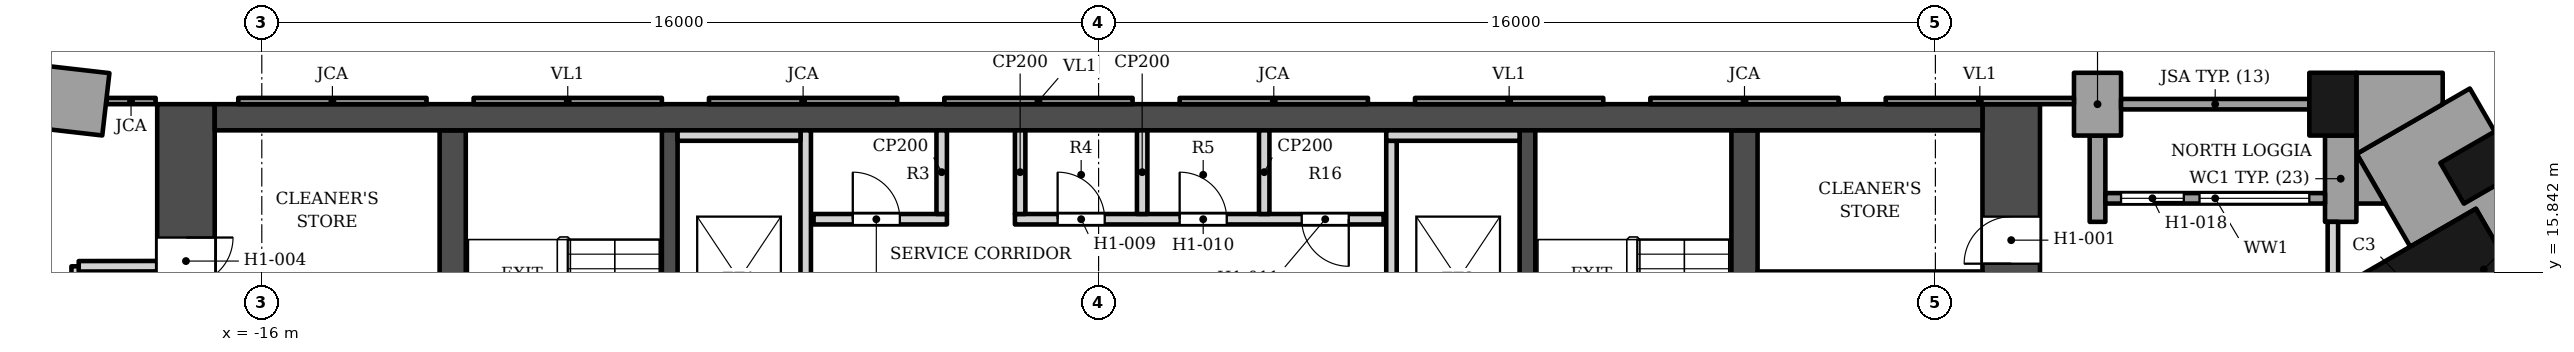
"""IFC4 building model, lengths in metres.
Left out: names, types, materials, properties, quantities, classifications, styles, units other than length and angle.
Written with IfcOpenShell. Run it as: python <this file> out.ifc"""

import sys

from ifc_helpers import new_model, si_unit, direction, frame, frame_2d, origin, origin_2d, place, context, subcontext, project, spatial, polyline, rectangle, outline, extrude, element, fill, save


model = new_model("IFC4")
c1 = context("Model", 3, precision=1e-05, world=origin(), true_north=direction((0.0, 1.0)))
c2 = subcontext(c1, "Body", "Model", "MODEL_VIEW")
j1 = project(units=[si_unit("LENGTHUNIT", "METRE"), si_unit("PLANEANGLEUNIT", "RADIAN")], contexts=[c1])
p1 = place(None, origin())
s1 = spatial("IfcSite", under=j1, at=p1, CompositionType="ELEMENT")
p2 = place(p1, origin())
s2 = spatial("IfcBuilding", under=s1, at=p2, CompositionType="ELEMENT")
p3 = place(p2, frame((0.0, 0.0, 46.0)))
s3 = spatial("IfcBuildingStorey", under=s2, at=p3, CompositionType="ELEMENT", Elevation=46.0)
p4 = place(p3, frame((-16.9, 18.802, 0.0), z_axis=(0.0, 0.0, 1.0), x_axis=(1.0, 0.0, 0.0)))
e1 = element("IfcWall", 1, at=p4, inside=s3, PredefinedType="SHEAR", context=c2, shape_type="SweptSolid", body=[
    extrude(rectangle(XDim=33.8, YDim=0.5, at=frame_2d((16.9, 0.0))), origin(), (0.0, 0.0, 1.0), 3.4),
])
p5 = place(p3, frame((-12.35, 5.253, 0.0), z_axis=(0.0, 0.0, 1.0), x_axis=(0.0, 1.0, 0.0)))
e2 = element("IfcWall", 2, at=p5, inside=s3, PredefinedType="SHEAR", context=c2, shape_type="SweptSolid", body=[
    extrude(rectangle(XDim=13.3, YDim=0.5, at=frame_2d((6.65, 0.0))), origin(), (0.0, 0.0, 1.0), 3.4),
])
p6 = place(p3, frame((-8.2, 5.253, 0.0), z_axis=(0.0, 0.0, 1.0), x_axis=(0.0, 1.0, 0.0)))
e3 = element("IfcWall", 3, at=p6, inside=s3, PredefinedType="SHEAR", context=c2, shape_type="SweptSolid", body=[
    extrude(rectangle(XDim=13.3, YDim=0.3, at=frame_2d((6.65, 0.0))), origin(), (0.0, 0.0, 1.0), 3.4),
])
p7 = place(p6, frame((7.1, 0.0, 0.0)))
e4 = element("IfcOpeningElement", 4, at=p7, cuts=e3, PredefinedType="OPENING", context=c2, shape_type="SweptSolid", body=[
    extrude(rectangle(XDim=1.4, YDim=2.1, at=frame_2d((0.7, 1.05))), frame((0.0, 0.16, 0.0), z_axis=(0.0, -1.0, 0.0), x_axis=(1.0, 0.0, 0.0)), (0.0, 0.0, 1.0), 0.32),
])
p8 = place(p6, frame((5.05, 0.0, 0.0)))
e5 = element("IfcOpeningElement", 5, at=p8, cuts=e3, PredefinedType="OPENING", context=c2, shape_type="SweptSolid", body=[
    extrude(rectangle(XDim=1.4, YDim=2.1, at=frame_2d((0.7, 1.05))), frame((0.0, 0.16, 0.0), z_axis=(0.0, -1.0, 0.0), x_axis=(1.0, 0.0, 0.0)), (0.0, 0.0, 1.0), 0.32),
])
p9 = place(p3, frame((12.35, 5.253, 0.0), z_axis=(0.0, 0.0, 1.0), x_axis=(0.0, 1.0, 0.0)))
e6 = element("IfcWall", 6, at=p9, inside=s3, PredefinedType="SHEAR", context=c2, shape_type="SweptSolid", body=[
    extrude(rectangle(XDim=13.3, YDim=0.5, at=frame_2d((6.65, 0.0))), origin(), (0.0, 0.0, 1.0), 3.4),
])
p10 = place(p3, frame((8.2, 5.253, 0.0), z_axis=(0.0, 0.0, 1.0), x_axis=(0.0, 1.0, 0.0)))
e7 = element("IfcWall", 7, at=p10, inside=s3, PredefinedType="SHEAR", context=c2, shape_type="SweptSolid", body=[
    extrude(rectangle(XDim=13.3, YDim=0.3, at=frame_2d((6.65, 0.0))), origin(), (0.0, 0.0, 1.0), 3.4),
])
p11 = place(p10, frame((7.1, 0.0, 0.0)))
e8 = element("IfcOpeningElement", 8, at=p11, cuts=e7, PredefinedType="OPENING", context=c2, shape_type="SweptSolid", body=[
    extrude(rectangle(XDim=1.4, YDim=2.1, at=frame_2d((0.7, 1.05))), frame((0.0, 0.16, 0.0), z_axis=(0.0, -1.0, 0.0), x_axis=(1.0, 0.0, 0.0)), (0.0, 0.0, 1.0), 0.32),
])
p12 = place(p10, frame((5.05, 0.0, 0.0)))
e9 = element("IfcOpeningElement", 9, at=p12, cuts=e7, PredefinedType="OPENING", context=c2, shape_type="SweptSolid", body=[
    extrude(rectangle(XDim=1.4, YDim=2.1, at=frame_2d((0.7, 1.05))), frame((0.0, 0.16, 0.0), z_axis=(0.0, -1.0, 0.0), x_axis=(1.0, 0.0, 0.0)), (0.0, 0.0, 1.0), 0.32),
])
p13 = place(p3, frame((-17.45, 5.853, 0.0), z_axis=(0.0, 0.0, 1.0), x_axis=(0.0, 1.0, 0.0)))
e10 = element("IfcWall", 10, at=p13, inside=s3, PredefinedType="SHEAR", context=c2, shape_type="SweptSolid", body=[
    extrude(rectangle(XDim=13.2, YDim=1.1, at=frame_2d((6.6, 0.0))), origin(), (0.0, 0.0, 1.0), 3.4),
])
p14 = place(p13, frame((4.1, 0.0, 0.0)))
e11 = element("IfcOpeningElement", 11, at=p14, cuts=e10, PredefinedType="OPENING", context=c2, shape_type="SweptSolid", body=[
    extrude(rectangle(XDim=1.6, YDim=2.1, at=frame_2d((0.8, 1.05))), frame((0.0, 0.56, 0.0), z_axis=(0.0, -1.0, 0.0), x_axis=(1.0, 0.0, 0.0)), (0.0, 0.0, 1.0), 1.12),
])
p15 = place(p13, frame((9.75, 0.0, 0.0)))
e12 = element("IfcOpeningElement", 12, at=p15, cuts=e10, PredefinedType="OPENING", context=c2, shape_type="SweptSolid", body=[
    extrude(rectangle(XDim=0.9, YDim=2.1, at=frame_2d((0.45, 1.05))), frame((0.0, 0.56, 0.0), z_axis=(0.0, -1.0, 0.0), x_axis=(1.0, 0.0, 0.0)), (0.0, 0.0, 1.0), 1.12),
])
p16 = place(p3, frame((17.45, 5.853, 0.0), z_axis=(0.0, 0.0, 1.0), x_axis=(0.0, 1.0, 0.0)))
e13 = element("IfcWall", 13, at=p16, inside=s3, PredefinedType="SHEAR", context=c2, shape_type="SweptSolid", body=[
    extrude(rectangle(XDim=13.2, YDim=1.1, at=frame_2d((6.6, 0.0))), origin(), (0.0, 0.0, 1.0), 3.4),
])
p17 = place(p16, frame((4.1, 0.0, 0.0)))
e14 = element("IfcOpeningElement", 14, at=p17, cuts=e13, PredefinedType="OPENING", context=c2, shape_type="SweptSolid", body=[
    extrude(rectangle(XDim=1.6, YDim=2.1, at=frame_2d((0.8, 1.05))), frame((0.0, 0.56, 0.0), z_axis=(0.0, -1.0, 0.0), x_axis=(1.0, 0.0, 0.0)), (0.0, 0.0, 1.0), 1.12),
])
p18 = place(p16, frame((10.15, 0.0, 0.0)))
e15 = element("IfcOpeningElement", 15, at=p18, cuts=e13, PredefinedType="OPENING", context=c2, shape_type="SweptSolid", body=[
    extrude(rectangle(XDim=0.9, YDim=2.1, at=frame_2d((0.45, 1.05))), frame((0.0, 0.56, 0.0), z_axis=(0.0, -1.0, 0.0), x_axis=(1.0, 0.0, 0.0)), (0.0, 0.0, 1.0), 1.12),
])
p19 = place(p3, frame((25.75, 14.867, 0.0), z_axis=(0.0, 0.0, 1.0), x_axis=(-0.866025386331, -0.50000003023, 0.0)))
e16 = element("IfcColumn", 16, at=p19, inside=s3, PredefinedType="COLUMN", context=c2, shape_type="SweptSolid", body=[
    extrude(rectangle(XDim=3.2, YDim=3.2, at=origin_2d()), origin(), (0.0, 0.0, 1.0), 3.4),
])
for number, where, z_axis, x_axis in (
    (17, (26.4, 17.84, 0.0), (0.0, 0.0, 1.0), (-0.5, 0.866, 0.0)),
    (18, (23.6, 19.053, 0.0), (0.0, 0.0, 1.0), (-1.0, 0.0, 0.0)),
):
    element("IfcColumn", number, at=place(p3, frame(where, z_axis=z_axis, x_axis=x_axis)), inside=s3, PredefinedType="COLUMN", context=c2, shape_type="SweptSolid", body=[
        extrude(rectangle(XDim=0.9, YDim=1.2, at=origin_2d()), origin(), (0.0, 0.0, 1.0), 3.4),
    ])
p20 = place(p3, origin())
e19 = element("IfcWall", 19, at=p20, inside=s3, PredefinedType="SOLIDWALL", context=c2, shape_type="SweptSolid", body=[
    extrude(outline(polyline([(24.05, 16.802), (24.05, 18.453), (23.45, 18.453), (23.45, 16.802), (24.05, 16.802)])), origin(), (0.0, 0.0, 1.0), 2.63),
])
p21 = place(p3, origin())
e20 = element("IfcWall", 20, at=p21, inside=s3, PredefinedType="SOLIDWALL", context=c2, shape_type="SweptSolid", body=[
    extrude(outline(polyline([(19.55, 19.653), (18.65, 19.653), (18.65, 18.453), (19.55, 18.453), (19.55, 19.653)])), origin(), (0.0, 0.0, 1.0), 2.65),
])
p22 = place(p3, origin())
e21 = element("IfcWall", 21, at=p22, inside=s3, PredefinedType="SOLIDWALL", context=c2, shape_type="SweptSolid", body=[
    extrude(outline(polyline([(18.95, 18.453), (18.95, 16.802), (19.25, 16.802), (19.25, 18.453), (18.95, 18.453)])), origin(), (0.0, 0.0, 1.0), 2.65),
])
p23 = place(p3, frame((23.15, 19.052, 0.0), z_axis=(0.0, 0.0, 1.0), x_axis=(-1.0, 0.0, 0.0)))
e22 = element("IfcWall", 22, at=p23, inside=s3, PredefinedType="SOLIDWALL", context=c2, shape_type="SweptSolid", body=[
    extrude(rectangle(XDim=3.6, YDim=0.2, at=frame_2d((1.8, 0.0))), origin(), (0.0, 0.0, 1.0), 2.65),
])
p24 = place(p3, frame((23.45, 17.252, 0.0), z_axis=(0.0, 0.0, 1.0), x_axis=(-1.0, 0.0, 0.0)))
e23 = element("IfcWall", 23, at=p24, inside=s3, PredefinedType="ELEMENTEDWALL", context=c2, shape_type="SweptSolid", body=[
    extrude(rectangle(XDim=4.2, YDim=0.2, at=frame_2d((2.1, 0.0))), origin(), (0.0, 0.0, 1.0), 2.65),
])
p25 = place(p24, frame((0.3, 0.0, 0.6)))
e24 = element("IfcOpeningElement", 24, at=p25, cuts=e23, PredefinedType="OPENING", context=c2, shape_type="SweptSolid", body=[
    extrude(rectangle(XDim=2.1, YDim=1.8, at=frame_2d((1.05, 0.9))), frame((0.0, 0.11, 0.0), z_axis=(0.0, -1.0, 0.0), x_axis=(1.0, 0.0, 0.0)), (0.0, 0.0, 1.0), 0.22),
])
p26 = place(p24, frame((2.7, 0.0, 0.0)))
e25 = element("IfcOpeningElement", 25, at=p26, cuts=e23, PredefinedType="OPENING", context=c2, shape_type="SweptSolid", body=[
    extrude(rectangle(XDim=1.2, YDim=2.4, at=frame_2d((0.6, 1.2))), frame((0.0, 0.11, 0.0), z_axis=(0.0, -1.0, 0.0), x_axis=(1.0, 0.0, 0.0)), (0.0, 0.0, 1.0), 0.22),
])
p27 = place(p3, origin())
e26 = element("IfcWall", 26, at=p27, inside=s3, PredefinedType="ELEMENTEDWALL", context=c2, shape_type="SweptSolid", body=[
    extrude(outline(polyline([(15.05, 19.173), (15.05, 19.052), (18.649, 19.052), (18.649, 19.173), (15.05, 19.173)])), origin(), (0.0, 0.0, 1.0), 2.65),
])
p28 = place(p3, origin())
e27 = element("IfcWall", 27, at=p28, inside=s3, PredefinedType="SOLIDWALL", context=c2, shape_type="SweptSolid", body=[
    extrude(outline(polyline([(10.55, 19.173), (10.55, 19.052), (14.15, 19.052), (14.15, 19.173), (10.55, 19.173)])), origin(), (0.0, 0.0, 1.0), 2.65),
])
p29 = place(p3, origin())
e28 = element("IfcWall", 28, at=p29, inside=s3, PredefinedType="ELEMENTEDWALL", context=c2, shape_type="SweptSolid", body=[
    extrude(outline(polyline([(6.05, 19.173), (6.05, 19.052), (9.65, 19.052), (9.65, 19.173), (6.05, 19.173)])), origin(), (0.0, 0.0, 1.0), 2.65),
])
p30 = place(p3, origin())
e29 = element("IfcWall", 29, at=p30, inside=s3, PredefinedType="SOLIDWALL", context=c2, shape_type="SweptSolid", body=[
    extrude(outline(polyline([(1.55, 19.173), (1.55, 19.052), (5.15, 19.052), (5.15, 19.173), (1.55, 19.173)])), origin(), (0.0, 0.0, 1.0), 2.65),
])
p31 = place(p3, origin())
e30 = element("IfcWall", 30, at=p31, inside=s3, PredefinedType="ELEMENTEDWALL", context=c2, shape_type="SweptSolid", body=[
    extrude(outline(polyline([(-2.95, 19.173), (-2.95, 19.052), (0.65, 19.052), (0.65, 19.173), (-2.95, 19.173)])), origin(), (0.0, 0.0, 1.0), 2.65),
])
p32 = place(p3, origin())
e31 = element("IfcWall", 31, at=p32, inside=s3, PredefinedType="SOLIDWALL", context=c2, shape_type="SweptSolid", body=[
    extrude(outline(polyline([(-7.45, 19.173), (-7.45, 19.052), (-3.85, 19.052), (-3.85, 19.173), (-7.45, 19.173)])), origin(), (0.0, 0.0, 1.0), 2.65),
])
p33 = place(p3, origin())
e32 = element("IfcWall", 32, at=p33, inside=s3, PredefinedType="ELEMENTEDWALL", context=c2, shape_type="SweptSolid", body=[
    extrude(outline(polyline([(-11.95, 19.173), (-11.95, 19.052), (-8.35, 19.052), (-8.35, 19.173), (-11.95, 19.173)])), origin(), (0.0, 0.0, 1.0), 2.65),
])
p34 = place(p3, origin())
e33 = element("IfcWall", 33, at=p34, inside=s3, PredefinedType="SOLIDWALL", context=c2, shape_type="SweptSolid", body=[
    extrude(outline(polyline([(-16.45, 19.173), (-16.45, 19.052), (-12.85, 19.052), (-12.85, 19.173), (-16.45, 19.173)])), origin(), (0.0, 0.0, 1.0), 2.65),
])
p35 = place(p3, origin())
e34 = element("IfcWall", 34, at=p35, inside=s3, PredefinedType="SOLIDWALL", context=c2, shape_type="SweptSolid", body=[
    extrude(outline(polyline([(27.936, 14.281), (26.679, 13.556), (27.156, 12.73), (27.705, 13.681), (28.311, 13.331), (27.905, 14.033), (28.945, 14.633), (26.22, 19.353), (24.054, 18.103), (25.079, 16.327), (26.336, 17.053), (27.936, 14.281)])), origin(), (0.0, 0.0, 1.0), 2.63),
])
p36 = place(p3, origin())
e35 = element("IfcWall", 35, at=p36, inside=s3, PredefinedType="SOLIDWALL", context=c2, shape_type="SweptSolid", body=[
    extrude(outline(polyline([(24.05, 19.653), (24.05, 17.153), (24.603, 17.153), (24.054, 18.103), (25.7, 19.052), (25.7, 19.653), (24.05, 19.653)])), origin(), (0.0, 0.0, 1.0), 2.63),
])
p37 = place(p3, frame((-21.92, 19.387, 0.0), z_axis=(0.0, 0.0, 1.0), x_axis=(0.993507634887, -0.113765457942, 0.0)))
e36 = element("IfcWall", 36, at=p37, inside=s3, PredefinedType="SOLIDWALL", context=c2, shape_type="SweptSolid", body=[
    extrude(rectangle(XDim=2.957, YDim=1.2, at=frame_2d((1.479, 0.0))), origin(), (0.0, 0.0, 1.0), 2.65),
])
p38 = place(p3, frame((-18.97, 19.113, 0.0), z_axis=(0.0, 0.0, 1.0), x_axis=(1.0, 0.0, 0.0)))
e37 = element("IfcWall", 37, at=p38, inside=s3, PredefinedType="SOLIDWALL", context=c2, shape_type="SweptSolid", body=[
    extrude(rectangle(XDim=0.94, YDim=0.12, at=frame_2d((0.47, 0.0))), origin(), (0.0, 0.0, 1.0), 2.65),
])
p39 = place(p3, frame((-5.6, 14.253, 0.0), z_axis=(0.0, 0.0, 1.0), x_axis=(0.0, 1.0, 0.0)))
e38 = element("IfcWall", 38, at=p39, inside=s3, PredefinedType="SOLIDWALL", context=c2, shape_type="SweptSolid", body=[
    extrude(rectangle(XDim=4.3, YDim=0.2, at=frame_2d((2.15, 0.0))), origin(), (0.0, 0.0, 1.0), 3.23),
])
p40 = place(p3, frame((5.6, 15.453, 0.0), z_axis=(0.0, 0.0, 1.0), x_axis=(0.0, 1.0, 0.0)))
e39 = element("IfcWall", 39, at=p40, inside=s3, PredefinedType="SOLIDWALL", context=c2, shape_type="SweptSolid", body=[
    extrude(rectangle(XDim=2.9, YDim=0.2, at=frame_2d((1.45, 0.0))), origin(), (0.0, 0.0, 1.0), 3.23),
])
p41 = place(p3, frame((12.6, 15.753, 0.0), z_axis=(0.0, 0.0, 1.0), x_axis=(1.0, 0.0, 0.0)))
e40 = element("IfcWall", 40, at=p41, inside=s3, PredefinedType="SOLIDWALL", context=c2, shape_type="SweptSolid", body=[
    extrude(rectangle(XDim=4.3, YDim=0.2, at=frame_2d((2.15, 0.0))), origin(), (0.0, 0.0, 1.0), 3.23),
])
p42 = place(p3, frame((-5.45, 16.853, 0.0), z_axis=(0.0, 0.0, 1.0), x_axis=(1.0, 0.0, 0.0)))
e41 = element("IfcWall", 41, at=p42, inside=s3, PredefinedType="SOLIDWALL", context=c2, shape_type="SweptSolid", body=[
    extrude(rectangle(XDim=2.55, YDim=0.2, at=frame_2d((1.275, 0.0))), origin(), (0.0, 0.0, 1.0), 3.23),
])
p43 = place(p42, frame((0.75, 0.0, 0.0)))
e42 = element("IfcOpeningElement", 42, at=p43, cuts=e41, PredefinedType="OPENING", context=c2, shape_type="SweptSolid", body=[
    extrude(rectangle(XDim=0.9, YDim=2.1, at=frame_2d((0.45, 1.05))), frame((0.0, 0.11, 0.0), z_axis=(0.0, -1.0, 0.0), x_axis=(1.0, 0.0, 0.0)), (0.0, 0.0, 1.0), 0.22),
])
p44 = place(p3, frame((-1.6, 16.853, 0.0), z_axis=(0.0, 0.0, 1.0), x_axis=(1.0, 0.0, 0.0)))
e43 = element("IfcWall", 43, at=p44, inside=s3, PredefinedType="SOLIDWALL", context=c2, shape_type="SweptSolid", body=[
    extrude(rectangle(XDim=7.05, YDim=0.2, at=frame_2d((3.525, 0.0))), origin(), (0.0, 0.0, 1.0), 3.23),
])
p45 = place(p44, frame((0.817, 0.0, 0.0)))
e44 = element("IfcOpeningElement", 44, at=p45, cuts=e43, PredefinedType="OPENING", context=c2, shape_type="SweptSolid", body=[
    extrude(rectangle(XDim=0.9, YDim=2.1, at=frame_2d((0.45, 1.05))), frame((0.0, 0.11, 0.0), z_axis=(0.0, -1.0, 0.0), x_axis=(1.0, 0.0, 0.0)), (0.0, 0.0, 1.0), 0.22),
])
p46 = place(p44, frame((3.15, 0.0, 0.0)))
e45 = element("IfcOpeningElement", 45, at=p46, cuts=e43, PredefinedType="OPENING", context=c2, shape_type="SweptSolid", body=[
    extrude(rectangle(XDim=0.9, YDim=2.1, at=frame_2d((0.45, 1.05))), frame((0.0, 0.11, 0.0), z_axis=(0.0, -1.0, 0.0), x_axis=(1.0, 0.0, 0.0)), (0.0, 0.0, 1.0), 0.22),
])
p47 = place(p44, frame((5.483, 0.0, 0.0)))
e46 = element("IfcOpeningElement", 46, at=p47, cuts=e43, PredefinedType="OPENING", context=c2, shape_type="SweptSolid", body=[
    extrude(rectangle(XDim=0.9, YDim=2.1, at=frame_2d((0.45, 1.05))), frame((0.0, 0.11, 0.0), z_axis=(0.0, -1.0, 0.0), x_axis=(1.0, 0.0, 0.0)), (0.0, 0.0, 1.0), 0.22),
])
for number, where, z_axis, x_axis in (
    (47, (-3.0, 16.953, 0.0), (0.0, 0.0, 1.0), (0.0, 1.0, 0.0)),
    (48, (-1.5, 16.953, 0.0), (0.0, 0.0, 1.0), (0.0, 1.0, 0.0)),
    (49, (0.833, 16.953, 0.0), (0.0, 0.0, 1.0), (0.0, 1.0, 0.0)),
    (50, (3.167, 16.953, 0.0), (0.0, 0.0, 1.0), (0.0, 1.0, 0.0)),
):
    element("IfcWall", number, at=place(p3, frame(where, z_axis=z_axis, x_axis=x_axis)), inside=s3, PredefinedType="PARTITIONING", context=c2, shape_type="SweptSolid", body=[
        extrude(rectangle(XDim=1.6, YDim=0.2, at=frame_2d((0.8, 0.0))), origin(), (0.0, 0.0, 1.0), 3.23),
    ])
p48 = place(p3, frame((-8.05, 18.453, 0.0), z_axis=(0.0, 0.0, 1.0), x_axis=(1.0, 0.0, 0.0)))
e51 = element("IfcWall", 51, at=p48, inside=s3, PredefinedType="SOLIDWALL", context=c2, shape_type="SweptSolid", body=[
    extrude(rectangle(XDim=2.35, YDim=0.2, at=frame_2d((1.175, 0.0))), origin(), (0.0, 0.0, 1.0), 3.23),
])
p49 = place(p3, frame((5.5, 18.453, 0.0), z_axis=(0.0, 0.0, 1.0), x_axis=(1.0, 0.0, 0.0)))
e52 = element("IfcWall", 52, at=p49, inside=s3, PredefinedType="SOLIDWALL", context=c2, shape_type="SweptSolid", body=[
    extrude(rectangle(XDim=2.55, YDim=0.2, at=frame_2d((1.275, 0.0))), origin(), (0.0, 0.0, 1.0), 3.23),
])
p50 = place(p3, frame((-19.54, 15.952, 0.0), z_axis=(0.0, 0.0, 1.0), x_axis=(0.004974455496, -0.99998762732, 0.0)))
e53 = element("IfcWall", 53, at=p50, inside=s3, PredefinedType="PARTITIONING", context=c2, shape_type="SweptSolid", body=[
    extrude(rectangle(XDim=8.0, YDim=0.2, at=frame_2d((4.0, 0.0))), origin(), (0.0, 0.0, 1.0), 3.23),
])
p51 = place(p50, frame((5.359, 0.0, 0.0)))
e54 = element("IfcOpeningElement", 54, at=p51, cuts=e53, PredefinedType="OPENING", context=c2, shape_type="SweptSolid", body=[
    extrude(rectangle(XDim=1.6, YDim=2.1, at=frame_2d((0.8, 1.05))), frame((0.0, 0.11, 0.0), z_axis=(0.0, -1.0, 0.0), x_axis=(1.0, 0.0, 0.0)), (0.0, 0.0, 1.0), 0.22),
])
p52 = place(p50, frame((0.45, 0.0, 0.0)))
e55 = element("IfcOpeningElement", 55, at=p52, cuts=e53, PredefinedType="OPENING", context=c2, shape_type="SweptSolid", body=[
    extrude(rectangle(XDim=1.6, YDim=2.1, at=frame_2d((0.8, 1.05))), frame((0.0, 0.11, 0.0), z_axis=(0.0, -1.0, 0.0), x_axis=(1.0, 0.0, 0.0)), (0.0, 0.0, 1.0), 0.22),
])
p53 = place(p3, frame((-19.5, 15.953, 0.0), z_axis=(0.0, 0.0, 1.0), x_axis=(0.999999152842, 0.001301658513, 0.0)))
e56 = element("IfcWall", 56, at=p53, inside=s3, PredefinedType="PARTITIONING", context=c2, shape_type="SweptSolid", body=[
    extrude(rectangle(XDim=1.5, YDim=0.2, at=frame_2d((0.75, 0.0))), origin(), (0.0, 0.0, 1.0), 3.23),
])
p54 = place(p3, frame((23.6, 15.252, 0.0), z_axis=(0.0, 0.0, 1.0), x_axis=(0.000157480313, 0.9999999876, 0.0)))
e57 = element("IfcWall", 57, at=p54, inside=s3, PredefinedType="PARTITIONING", context=c2, shape_type="SweptSolid", body=[
    extrude(rectangle(XDim=1.55, YDim=0.2, at=frame_2d((0.775, 0.0))), origin(), (0.0, 0.0, 1.0), 3.23),
])
p55 = place(p25, origin())
e58 = element("IfcWindow", 58, at=p55, inside=s3, PartitioningType="SINGLE_PANEL", PredefinedType="WINDOW", context=c2, shape_type="SweptSolid", body=[
    extrude(rectangle(XDim=2.1, YDim=1.8, at=frame_2d((1.05, 0.9))), frame((0.0, 0.03, 0.0), z_axis=(0.0, -1.0, 0.0), x_axis=(1.0, 0.0, 0.0)), (0.0, 0.0, 1.0), 0.06),
])
fill(e24, e58)
p56 = place(p26, origin())
e59 = element("IfcDoor", 59, at=p56, inside=s3, OperationType="SINGLE_SWING_LEFT", PredefinedType="DOOR", context=c2, shape_type="SweptSolid", body=[
    extrude(rectangle(XDim=1.2, YDim=2.4, at=frame_2d((0.6, 1.2))), frame((0.0, 0.025, 0.0), z_axis=(0.0, -1.0, 0.0), x_axis=(1.0, 0.0, 0.0)), (0.0, 0.0, 1.0), 0.05),
])
fill(e25, e59)
p57 = place(p43, origin())
e60 = element("IfcDoor", 60, at=p57, inside=s3, OperationType="SINGLE_SWING_LEFT", PredefinedType="DOOR", context=c2, shape_type="SweptSolid", body=[
    extrude(rectangle(XDim=0.9, YDim=2.1, at=frame_2d((0.45, 1.05))), frame((0.0, 0.025, 0.0), z_axis=(0.0, -1.0, 0.0), x_axis=(1.0, 0.0, 0.0)), (0.0, 0.0, 1.0), 0.05),
])
fill(e42, e60)
p58 = place(p45, origin())
e61 = element("IfcDoor", 61, at=p58, inside=s3, OperationType="SINGLE_SWING_LEFT", PredefinedType="DOOR", context=c2, shape_type="SweptSolid", body=[
    extrude(rectangle(XDim=0.9, YDim=2.1, at=frame_2d((0.45, 1.05))), frame((0.0, 0.025, 0.0), z_axis=(0.0, -1.0, 0.0), x_axis=(1.0, 0.0, 0.0)), (0.0, 0.0, 1.0), 0.05),
])
fill(e44, e61)
p59 = place(p46, origin())
e62 = element("IfcDoor", 62, at=p59, inside=s3, OperationType="SINGLE_SWING_LEFT", PredefinedType="DOOR", context=c2, shape_type="SweptSolid", body=[
    extrude(rectangle(XDim=0.9, YDim=2.1, at=frame_2d((0.45, 1.05))), frame((0.0, 0.025, 0.0), z_axis=(0.0, -1.0, 0.0), x_axis=(1.0, 0.0, 0.0)), (0.0, 0.0, 1.0), 0.05),
])
fill(e45, e62)
p60 = place(p47, origin())
e63 = element("IfcDoor", 63, at=p60, inside=s3, OperationType="SINGLE_SWING_RIGHT", PredefinedType="DOOR", context=c2, shape_type="SweptSolid", body=[
    extrude(rectangle(XDim=0.9, YDim=2.1, at=frame_2d((0.45, 1.05))), frame((0.0, 0.025, 0.0), z_axis=(0.0, -1.0, 0.0), x_axis=(1.0, 0.0, 0.0)), (0.0, 0.0, 1.0), 0.05),
])
fill(e46, e63)
p61 = place(p15, origin())
e64 = element("IfcDoor", 64, at=p61, inside=s3, OperationType="SINGLE_SWING_RIGHT", PredefinedType="DOOR", context=c2, shape_type="SweptSolid", body=[
    extrude(rectangle(XDim=0.9, YDim=2.1, at=frame_2d((0.45, 1.05))), frame((0.0, -0.225, 0.0), z_axis=(0.0, -1.0, 0.0), x_axis=(1.0, 0.0, 0.0)), (0.0, 0.0, 1.0), 0.05),
])
fill(e12, e64)
p62 = place(p18, origin())
e65 = element("IfcDoor", 65, at=p62, inside=s3, OperationType="SINGLE_SWING_LEFT", PredefinedType="DOOR", context=c2, shape_type="SweptSolid", body=[
    extrude(rectangle(XDim=0.9, YDim=2.1, at=frame_2d((0.45, 1.05))), frame((0.0, 0.275, 0.0), z_axis=(0.0, -1.0, 0.0), x_axis=(1.0, 0.0, 0.0)), (0.0, 0.0, 1.0), 0.05),
])
fill(e15, e65)
save(model, sys.argv[1])
